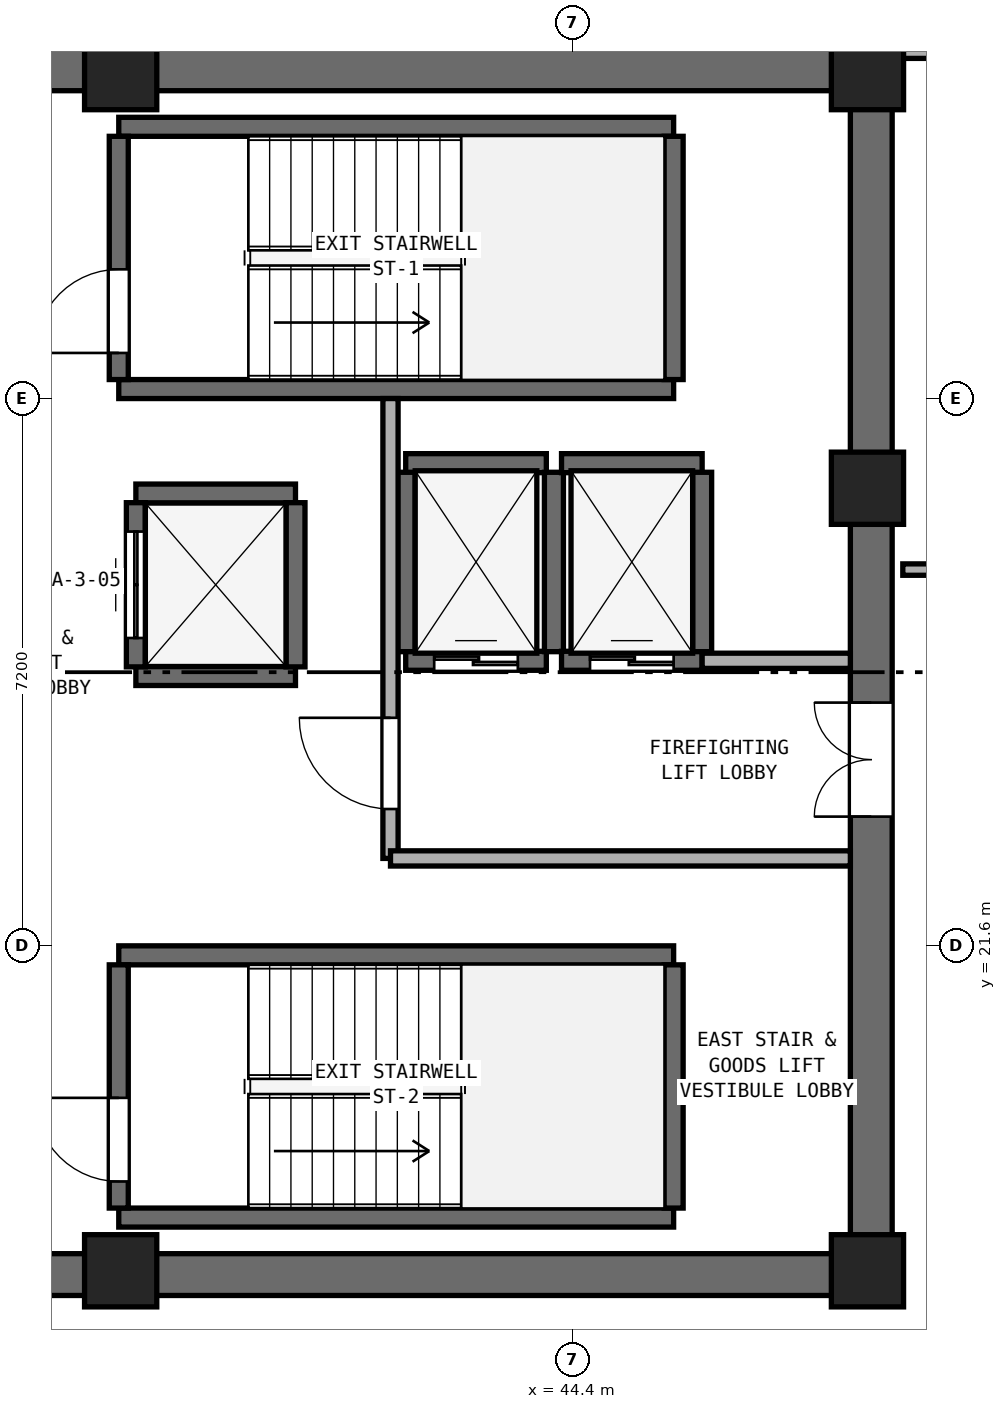
"""IFC4 building model, lengths in metres.
Left out: names, types, materials, properties, quantities, classifications, styles, units other than length and angle.
Written with IfcOpenShell. Run it as: python <this file> out.ifc"""

import sys

from ifc_helpers import new_model, si_unit, direction, frame, frame_2d, origin, origin_2d, place, context, subcontext, project, spatial, rectangle, extrude, element, fill, save


model = new_model("IFC4")
c1 = context("Model", 3, precision=1e-05, world=origin(), true_north=direction((0.0, 1.0)))
c2 = subcontext(c1, "Body", "Model", "MODEL_VIEW")
j1 = project(units=[si_unit("LENGTHUNIT", "METRE"), si_unit("PLANEANGLEUNIT", "RADIAN")], contexts=[c1])
p1 = place(None, origin())
s1 = spatial("IfcSite", under=j1, at=p1, CompositionType="ELEMENT")
p2 = place(p1, origin())
s2 = spatial("IfcBuilding", under=s1, at=p2, CompositionType="ELEMENT")
p3 = place(p2, frame((0.0, 0.0, 208.6)))
s3 = spatial("IfcBuildingStorey", under=s2, at=p3, CompositionType="ELEMENT", Elevation=208.6)
for number, where, z_axis, x_axis in (
    (1, (25.4, 17.275, 0.0), (0.0, 0.0, 1.0), (1.0, 0.0, 0.0)),
    (2, (25.4, 33.125, 0.0), (0.0, 0.0, 1.0), (1.0, 0.0, 0.0)),
):
    element("IfcWall", number, at=place(p3, frame(where, z_axis=z_axis, x_axis=x_axis)), inside=s3, PredefinedType="SHEAR", context=c2, shape_type="SweptSolid", body=[
        extrude(rectangle(XDim=23.2, YDim=0.55, at=frame_2d((11.6, 0.0))), origin(), (0.0, 0.0, 1.0), 3.54),
    ])
p4 = place(p3, frame((48.325, 17.55, 0.0), z_axis=(0.0, 0.0, 1.0), x_axis=(0.0, 1.0, 0.0)))
e3 = element("IfcWall", 3, at=p4, inside=s3, PredefinedType="SHEAR", context=c2, shape_type="SweptSolid", body=[
    extrude(rectangle(XDim=15.3, YDim=0.55, at=frame_2d((7.65, 0.0))), origin(), (0.0, 0.0, 1.0), 3.54),
])
p5 = place(p4, frame((5.75, 0.0, 0.0)))
e4 = element("IfcOpeningElement", 4, at=p5, cuts=e3, PredefinedType="OPENING", context=c2, shape_type="SweptSolid", body=[
    extrude(rectangle(XDim=1.5, YDim=2.15, at=frame_2d((0.75, 1.075))), frame((0.0, 0.285, 0.0), z_axis=(0.0, -1.0, 0.0), x_axis=(1.0, 0.0, 0.0)), (0.0, 0.0, 1.0), 0.57),
])
for number, where, z_axis, x_axis in (
    (5, (38.45, 17.325, 0.0), (0.0, 0.0, 1.0), (1.0, 0.0, 0.0)),
    (6, (48.275, 17.325, 0.0), (0.0, 0.0, 1.0), (1.0, 0.0, 0.0)),
    (7, (48.275, 27.62, 0.0), (0.0, 0.0, 1.0), (1.0, 0.0, 0.0)),
    (8, (48.275, 33.075, 0.0), (0.0, 0.0, 1.0), (1.0, 0.0, 0.0)),
    (9, (38.45, 33.075, 0.0), (0.0, 0.0, 1.0), (1.0, 0.0, 0.0)),
):
    element("IfcColumn", number, at=place(p3, frame(where, z_axis=z_axis, x_axis=x_axis)), inside=s3, PredefinedType="PILASTER", context=c2, shape_type="SweptSolid", body=[
        extrude(rectangle(XDim=0.95, YDim=0.95, at=origin_2d()), origin(), (0.0, 0.0, 1.0), 3.8),
    ])
for number, where, z_axis, x_axis in (
    (10, (38.425, 28.925, 0.0), (0.0, 0.0, 1.0), (1.0, 0.0, 0.0)),
    (11, (38.425, 32.375, 0.0), (0.0, 0.0, 1.0), (1.0, 0.0, 0.0)),
):
    element("IfcWall", number, at=place(p3, frame(where, z_axis=z_axis, x_axis=x_axis)), inside=s3, PredefinedType="SHEAR", context=c2, shape_type="SweptSolid", body=[
        extrude(rectangle(XDim=7.3, YDim=0.25, at=frame_2d((3.65, 0.0))), origin(), (0.0, 0.0, 1.0), 3.54),
    ])
p6 = place(p3, frame((38.425, 29.05, 0.0), z_axis=(0.0, 0.0, 1.0), x_axis=(0.0, 1.0, 0.0)))
e12 = element("IfcWall", 12, at=p6, inside=s3, PredefinedType="SHEAR", context=c2, shape_type="SweptSolid", body=[
    extrude(rectangle(XDim=3.2, YDim=0.25, at=frame_2d((1.6, 0.0))), origin(), (0.0, 0.0, 1.0), 3.54),
])
p7 = place(p6, frame((0.35, 0.0, 0.0)))
e13 = element("IfcOpeningElement", 13, at=p7, cuts=e12, PredefinedType="OPENING", context=c2, shape_type="SweptSolid", body=[
    extrude(rectangle(XDim=1.1, YDim=2.15, at=frame_2d((0.55, 1.075))), frame((0.0, 0.135, 0.0), z_axis=(0.0, -1.0, 0.0), x_axis=(1.0, 0.0, 0.0)), (0.0, 0.0, 1.0), 0.27),
])
p8 = place(p3, frame((45.725, 29.05, 0.0), z_axis=(0.0, 0.0, 1.0), x_axis=(0.0, 1.0, 0.0)))
e14 = element("IfcWall", 14, at=p8, inside=s3, PredefinedType="SHEAR", context=c2, shape_type="SweptSolid", body=[
    extrude(rectangle(XDim=3.2, YDim=0.25, at=frame_2d((1.6, 0.0))), origin(), (0.0, 0.0, 1.0), 3.54),
])
for number, where, z_axis, x_axis in (
    (15, (38.425, 18.025, 0.0), (0.0, 0.0, 1.0), (1.0, 0.0, 0.0)),
    (16, (38.425, 21.475, 0.0), (0.0, 0.0, 1.0), (1.0, 0.0, 0.0)),
):
    element("IfcWall", number, at=place(p3, frame(where, z_axis=z_axis, x_axis=x_axis)), inside=s3, PredefinedType="SHEAR", context=c2, shape_type="SweptSolid", body=[
        extrude(rectangle(XDim=7.3, YDim=0.25, at=frame_2d((3.65, 0.0))), origin(), (0.0, 0.0, 1.0), 3.54),
    ])
p9 = place(p3, frame((38.425, 18.15, 0.0), z_axis=(0.0, 0.0, 1.0), x_axis=(0.0, 1.0, 0.0)))
e17 = element("IfcWall", 17, at=p9, inside=s3, PredefinedType="SHEAR", context=c2, shape_type="SweptSolid", body=[
    extrude(rectangle(XDim=3.2, YDim=0.25, at=frame_2d((1.6, 0.0))), origin(), (0.0, 0.0, 1.0), 3.54),
])
p10 = place(p9, frame((0.35, 0.0, 0.0)))
e18 = element("IfcOpeningElement", 18, at=p10, cuts=e17, PredefinedType="OPENING", context=c2, shape_type="SweptSolid", body=[
    extrude(rectangle(XDim=1.1, YDim=2.15, at=frame_2d((0.55, 1.075))), frame((0.0, 0.135, 0.0), z_axis=(0.0, -1.0, 0.0), x_axis=(1.0, 0.0, 0.0)), (0.0, 0.0, 1.0), 0.27),
])
p11 = place(p3, frame((45.725, 18.15, 0.0), z_axis=(0.0, 0.0, 1.0), x_axis=(0.0, 1.0, 0.0)))
e19 = element("IfcWall", 19, at=p11, inside=s3, PredefinedType="SHEAR", context=c2, shape_type="SweptSolid", body=[
    extrude(rectangle(XDim=3.2, YDim=0.25, at=frame_2d((1.6, 0.0))), origin(), (0.0, 0.0, 1.0), 3.54),
])
p12 = place(p3, frame((42.2, 25.35, 0.0), z_axis=(0.0, 0.0, 1.0), x_axis=(1.0, 0.0, 0.0)))
e20 = element("IfcWall", 20, at=p12, inside=s3, PredefinedType="SHEAR", context=c2, shape_type="SweptSolid", body=[
    extrude(rectangle(XDim=1.85, YDim=0.25, at=frame_2d((0.925, 0.0))), origin(), (0.0, 0.0, 1.0), 3.54),
])
p13 = place(p12, frame((0.375, 0.0, 0.0)))
e21 = element("IfcOpeningElement", 21, at=p13, cuts=e20, PredefinedType="OPENING", context=c2, shape_type="SweptSolid", body=[
    extrude(rectangle(XDim=1.1, YDim=2.15, at=frame_2d((0.55, 1.075))), frame((0.0, 0.135, 0.0), z_axis=(0.0, -1.0, 0.0), x_axis=(1.0, 0.0, 0.0)), (0.0, 0.0, 1.0), 0.27),
])
p14 = place(p3, frame((42.2, 27.95, 0.0), z_axis=(0.0, 0.0, 1.0), x_axis=(1.0, 0.0, 0.0)))
e22 = element("IfcWall", 22, at=p14, inside=s3, PredefinedType="SHEAR", context=c2, shape_type="SweptSolid", body=[
    extrude(rectangle(XDim=1.85, YDim=0.25, at=frame_2d((0.925, 0.0))), origin(), (0.0, 0.0, 1.0), 3.54),
])
for number, where, z_axis, x_axis in (
    (23, (42.2, 25.47, 0.0), (0.0, 0.0, 1.0), (0.0, 1.0, 0.0)),
    (24, (44.15, 25.47, 0.0), (0.0, 0.0, 1.0), (0.0, 1.0, 0.0)),
):
    element("IfcWall", number, at=place(p3, frame(where, z_axis=z_axis, x_axis=x_axis)), inside=s3, PredefinedType="SHEAR", context=c2, shape_type="SweptSolid", body=[
        extrude(rectangle(XDim=2.36, YDim=0.25, at=frame_2d((1.18, 0.0))), origin(), (0.0, 0.0, 1.0), 3.54),
    ])
p15 = place(p3, frame((44.25, 25.35, 0.0), z_axis=(0.0, 0.0, 1.0), x_axis=(1.0, 0.0, 0.0)))
e25 = element("IfcWall", 25, at=p15, inside=s3, PredefinedType="SHEAR", context=c2, shape_type="SweptSolid", body=[
    extrude(rectangle(XDim=1.85, YDim=0.25, at=frame_2d((0.925, 0.0))), origin(), (0.0, 0.0, 1.0), 3.54),
])
p16 = place(p15, frame((0.375, 0.0, 0.0)))
e26 = element("IfcOpeningElement", 26, at=p16, cuts=e25, PredefinedType="OPENING", context=c2, shape_type="SweptSolid", body=[
    extrude(rectangle(XDim=1.1, YDim=2.15, at=frame_2d((0.55, 1.075))), frame((0.0, 0.135, 0.0), z_axis=(0.0, -1.0, 0.0), x_axis=(1.0, 0.0, 0.0)), (0.0, 0.0, 1.0), 0.27),
])
p17 = place(p3, frame((44.25, 27.95, 0.0), z_axis=(0.0, 0.0, 1.0), x_axis=(1.0, 0.0, 0.0)))
e27 = element("IfcWall", 27, at=p17, inside=s3, PredefinedType="SHEAR", context=c2, shape_type="SweptSolid", body=[
    extrude(rectangle(XDim=1.85, YDim=0.25, at=frame_2d((0.925, 0.0))), origin(), (0.0, 0.0, 1.0), 3.54),
])
p18 = place(p3, frame((46.1, 25.47, 0.0), z_axis=(0.0, 0.0, 1.0), x_axis=(0.0, 1.0, 0.0)))
e28 = element("IfcWall", 28, at=p18, inside=s3, PredefinedType="SHEAR", context=c2, shape_type="SweptSolid", body=[
    extrude(rectangle(XDim=2.36, YDim=0.25, at=frame_2d((1.18, 0.0))), origin(), (0.0, 0.0, 1.0), 3.54),
])
for number, where, z_axis, x_axis in (
    (29, (38.65, 25.15, 0.0), (0.0, 0.0, 1.0), (1.0, 0.0, 0.0)),
    (30, (38.65, 27.55, 0.0), (0.0, 0.0, 1.0), (1.0, 0.0, 0.0)),
):
    element("IfcWall", number, at=place(p3, frame(where, z_axis=z_axis, x_axis=x_axis)), inside=s3, PredefinedType="SHEAR", context=c2, shape_type="SweptSolid", body=[
        extrude(rectangle(XDim=2.1, YDim=0.25, at=frame_2d((1.05, 0.0))), origin(), (0.0, 0.0, 1.0), 3.54),
    ])
p19 = place(p3, frame((38.65, 25.27, 0.0), z_axis=(0.0, 0.0, 1.0), x_axis=(0.0, 1.0, 0.0)))
e31 = element("IfcWall", 31, at=p19, inside=s3, PredefinedType="SHEAR", context=c2, shape_type="SweptSolid", body=[
    extrude(rectangle(XDim=2.16, YDim=0.25, at=frame_2d((1.08, 0.0))), origin(), (0.0, 0.0, 1.0), 3.54),
])
p20 = place(p19, frame((0.38, 0.0, 0.0)))
e32 = element("IfcOpeningElement", 32, at=p20, cuts=e31, PredefinedType="OPENING", context=c2, shape_type="SweptSolid", body=[
    extrude(rectangle(XDim=1.4, YDim=2.2, at=frame_2d((0.7, 1.1))), frame((0.0, 0.135, 0.0), z_axis=(0.0, -1.0, 0.0), x_axis=(1.0, 0.0, 0.0)), (0.0, 0.0, 1.0), 0.27),
])
p21 = place(p3, frame((40.75, 25.27, 0.0), z_axis=(0.0, 0.0, 1.0), x_axis=(0.0, 1.0, 0.0)))
e33 = element("IfcWall", 33, at=p21, inside=s3, PredefinedType="SHEAR", context=c2, shape_type="SweptSolid", body=[
    extrude(rectangle(XDim=2.16, YDim=0.25, at=frame_2d((1.08, 0.0))), origin(), (0.0, 0.0, 1.0), 3.54),
])
p22 = place(p3, frame((42.0, 22.75, 0.0), z_axis=(0.0, 0.0, 1.0), x_axis=(0.0, 1.0, 0.0)))
e34 = element("IfcWall", 34, at=p22, inside=s3, PredefinedType="SOLIDWALL", context=c2, shape_type="SweptSolid", body=[
    extrude(rectangle(XDim=6.05, YDim=0.2, at=frame_2d((3.025, 0.0))), origin(), (0.0, 0.0, 1.0), 3.54),
])
p23 = place(p22, frame((0.65, 0.0, 0.0)))
e35 = element("IfcOpeningElement", 35, at=p23, cuts=e34, PredefinedType="OPENING", context=c2, shape_type="SweptSolid", body=[
    extrude(rectangle(XDim=1.2, YDim=2.15, at=frame_2d((0.6, 1.075))), frame((0.0, 0.11, 0.0), z_axis=(0.0, -1.0, 0.0), x_axis=(1.0, 0.0, 0.0)), (0.0, 0.0, 1.0), 0.22),
])
p24 = place(p3, frame((42.0, 22.75, 0.0), z_axis=(0.0, 0.0, 1.0), x_axis=(1.0, 0.0, 0.0)))
e36 = element("IfcWall", 36, at=p24, inside=s3, PredefinedType="SOLIDWALL", context=c2, shape_type="SweptSolid", body=[
    extrude(rectangle(XDim=6.05, YDim=0.2, at=frame_2d((3.025, 0.0))), origin(), (0.0, 0.0, 1.0), 3.54),
])
p25 = place(p3, frame((46.1, 25.35, 0.0), z_axis=(0.0, 0.0, 1.0), x_axis=(1.0, 0.0, 0.0)))
e37 = element("IfcWall", 37, at=p25, inside=s3, PredefinedType="SOLIDWALL", context=c2, shape_type="SweptSolid", body=[
    extrude(rectangle(XDim=1.95, YDim=0.2, at=frame_2d((0.975, 0.0))), origin(), (0.0, 0.0, 1.0), 3.54),
])
p26 = place(p3, frame((48.74, 26.55, 0.0), z_axis=(0.0, 0.0, 1.0), x_axis=(1.0, 0.0, 0.0)))
e38 = element("IfcWall", 38, at=p26, inside=s3, PredefinedType="PARTITIONING", context=c2, shape_type="SweptSolid", body=[
    extrude(rectangle(XDim=14.855, YDim=0.15, at=frame_2d((7.427, 0.0))), origin(), (0.0, 0.0, 1.0), 3.54),
])
p27 = place(p26, frame((6.927, 0.0, 0.0)))
e39 = element("IfcOpeningElement", 39, at=p27, cuts=e38, PredefinedType="OPENING", context=c2, shape_type="SweptSolid", body=[
    extrude(rectangle(XDim=1.0, YDim=2.12, at=frame_2d((0.5, 1.06))), frame((0.0, 0.085, 0.0), z_axis=(0.0, -1.0, 0.0), x_axis=(1.0, 0.0, 0.0)), (0.0, 0.0, 1.0), 0.17),
])
p28 = place(p3, frame((48.74, 33.35, 0.0), z_axis=(0.0, 0.0, 1.0), x_axis=(1.0, 0.0, 0.0)))
e40 = element("IfcWall", 40, at=p28, inside=s3, PredefinedType="PARTITIONING", context=c2, shape_type="SweptSolid", body=[
    extrude(rectangle(XDim=14.855, YDim=0.15, at=frame_2d((7.427, 0.0))), origin(), (0.0, 0.0, 1.0), 2.923),
])
p29 = place(p7, origin())
e41 = element("IfcDoor", 41, at=p29, inside=s3, OperationType="SINGLE_SWING_LEFT", PredefinedType="DOOR", context=c2, shape_type="SweptSolid", body=[
    extrude(rectangle(XDim=1.1, YDim=2.15, at=frame_2d((0.55, 1.075))), frame((0.0, 0.025, 0.0), z_axis=(0.0, -1.0, 0.0), x_axis=(1.0, 0.0, 0.0)), (0.0, 0.0, 1.0), 0.05),
])
fill(e13, e41)
p30 = place(p10, origin())
e42 = element("IfcDoor", 42, at=p30, inside=s3, OperationType="SINGLE_SWING_RIGHT", PredefinedType="DOOR", context=c2, shape_type="SweptSolid", body=[
    extrude(rectangle(XDim=1.1, YDim=2.15, at=frame_2d((0.55, 1.075))), frame((0.0, 0.025, 0.0), z_axis=(0.0, -1.0, 0.0), x_axis=(1.0, 0.0, 0.0)), (0.0, 0.0, 1.0), 0.05),
])
fill(e18, e42)
p31 = place(p13, origin())
e43 = element("IfcDoor", 43, at=p31, inside=s3, OperationType="DOUBLE_DOOR_SLIDING", PredefinedType="DOOR", context=c2, shape_type="SweptSolid", body=[
    extrude(rectangle(XDim=1.1, YDim=2.15, at=frame_2d((0.55, 1.075))), frame((0.0, 0.025, 0.0), z_axis=(0.0, -1.0, 0.0), x_axis=(1.0, 0.0, 0.0)), (0.0, 0.0, 1.0), 0.05),
])
fill(e21, e43)
p32 = place(p16, origin())
e44 = element("IfcDoor", 44, at=p32, inside=s3, OperationType="DOUBLE_DOOR_SLIDING", PredefinedType="DOOR", context=c2, shape_type="SweptSolid", body=[
    extrude(rectangle(XDim=1.1, YDim=2.15, at=frame_2d((0.55, 1.075))), frame((0.0, 0.025, 0.0), z_axis=(0.0, -1.0, 0.0), x_axis=(1.0, 0.0, 0.0)), (0.0, 0.0, 1.0), 0.05),
])
fill(e26, e44)
p33 = place(p20, origin())
e45 = element("IfcDoor", 45, at=p33, inside=s3, OperationType="DOUBLE_DOOR_SLIDING", PredefinedType="DOOR", context=c2, shape_type="SweptSolid", body=[
    extrude(rectangle(XDim=1.4, YDim=2.2, at=frame_2d((0.7, 1.1))), frame((0.0, 0.025, 0.0), z_axis=(0.0, -1.0, 0.0), x_axis=(1.0, 0.0, 0.0)), (0.0, 0.0, 1.0), 0.05),
])
fill(e32, e45)
p34 = place(p23, origin())
e46 = element("IfcDoor", 46, at=p34, inside=s3, OperationType="SINGLE_SWING_RIGHT", PredefinedType="DOOR", context=c2, shape_type="SweptSolid", body=[
    extrude(rectangle(XDim=1.2, YDim=2.15, at=frame_2d((0.6, 1.075))), frame((0.0, 0.025, 0.0), z_axis=(0.0, -1.0, 0.0), x_axis=(1.0, 0.0, 0.0)), (0.0, 0.0, 1.0), 0.05),
])
fill(e35, e46)
p35 = place(p5, origin())
e47 = element("IfcDoor", 47, at=p35, inside=s3, OperationType="DOUBLE_DOOR_SINGLE_SWING", PredefinedType="DOOR", context=c2, shape_type="SweptSolid", body=[
    extrude(rectangle(XDim=1.5, YDim=2.15, at=frame_2d((0.75, 1.075))), frame((0.0, 0.025, 0.0), z_axis=(0.0, -1.0, 0.0), x_axis=(1.0, 0.0, 0.0)), (0.0, 0.0, 1.0), 0.05),
])
fill(e4, e47)
save(model, sys.argv[1])
